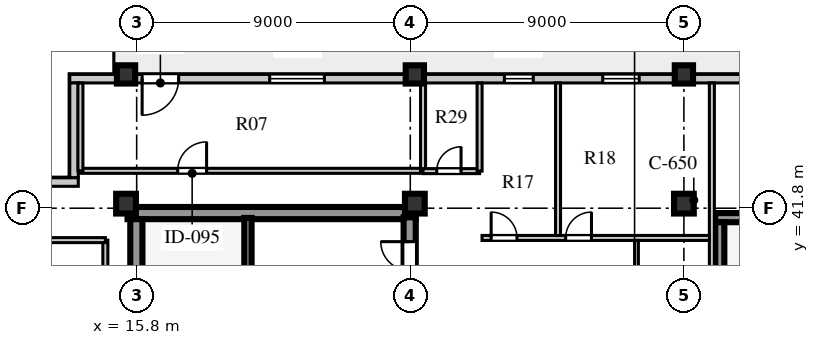
"""IFC4 building model, lengths in metres.
Left out: names, types, materials, properties, quantities, classifications, styles, units other than length and angle.
Written with IfcOpenShell. Run it as: python <this file> out.ifc"""

import sys

from ifc_helpers import new_model, si_unit, direction, frame, frame_2d, origin, origin_2d, place, context, subcontext, project, spatial, rectangle, extrude, element, fill, save


model = new_model("IFC4")
c1 = context("Model", 3, precision=1e-05, world=origin(), true_north=direction((0.0, 1.0)))
c2 = subcontext(c1, "Body", "Model", "MODEL_VIEW")
j1 = project(units=[si_unit("LENGTHUNIT", "METRE"), si_unit("PLANEANGLEUNIT", "RADIAN")], contexts=[c1])
p1 = place(None, origin())
s1 = spatial("IfcSite", under=j1, at=p1, CompositionType="ELEMENT")
p2 = place(p1, origin())
s2 = spatial("IfcBuilding", under=s1, at=p2, CompositionType="ELEMENT")
p3 = place(p2, frame((0.0, 0.0, 327.7)))
s3 = spatial("IfcBuildingStorey", under=s2, at=p3, CompositionType="ELEMENT", Elevation=327.7)
p4 = place(p3, frame((15.5, 41.64, 0.0), z_axis=(0.0, 0.0, 1.0), x_axis=(1.0, 0.0, 0.0)))
e1 = element("IfcWall", 1, at=p4, inside=s3, PredefinedType="SHEAR", context=c2, shape_type="SweptSolid", body=[
    extrude(rectangle(XDim=9.48, YDim=0.4, at=frame_2d((4.74, 0.0))), origin(), (0.0, 0.0, 1.0), 3.56),
])
p5 = place(p3, frame((15.79, 15.81, 0.0), z_axis=(0.0, 0.0, 1.0), x_axis=(0.0, 1.0, 0.0)))
e2 = element("IfcWall", 2, at=p5, inside=s3, PredefinedType="SHEAR", context=c2, shape_type="SweptSolid", body=[
    extrude(rectangle(XDim=25.63, YDim=0.4, at=frame_2d((12.815, 0.0))), origin(), (0.0, 0.0, 1.0), 3.56),
])
p6 = place(p3, frame((24.78, 15.74, 0.0), z_axis=(0.0, 0.0, 1.0), x_axis=(0.0, 1.0, 0.0)))
e3 = element("IfcWall", 3, at=p6, inside=s3, PredefinedType="SHEAR", context=c2, shape_type="SweptSolid", body=[
    extrude(rectangle(XDim=25.76, YDim=0.4, at=frame_2d((12.88, 0.0))), origin(), (0.0, 0.0, 1.0), 3.56),
])
p7 = place(p6, frame((1.61, 0.0, 0.0)))
e4 = element("IfcOpeningElement", 4, at=p7, cuts=e3, PredefinedType="OPENING", context=c2, shape_type="SweptSolid", body=[
    extrude(rectangle(XDim=1.2, YDim=2.1, at=frame_2d((0.6, 1.05))), frame((0.0, 0.21, 0.0), z_axis=(0.0, -1.0, 0.0), x_axis=(1.0, 0.0, 0.0)), (0.0, 0.0, 1.0), 0.42),
])
p8 = place(p6, frame((6.78, 0.0, 0.0)))
e5 = element("IfcOpeningElement", 5, at=p8, cuts=e3, PredefinedType="OPENING", context=c2, shape_type="SweptSolid", body=[
    extrude(rectangle(XDim=0.85, YDim=2.06, at=frame_2d((0.425, 1.03))), frame((0.0, 0.21, 0.0), z_axis=(0.0, -1.0, 0.0), x_axis=(1.0, 0.0, 0.0)), (0.0, 0.0, 1.0), 0.42),
])
p9 = place(p6, frame((12.11, 0.0, 0.0)))
e6 = element("IfcOpeningElement", 6, at=p9, cuts=e3, PredefinedType="OPENING", context=c2, shape_type="SweptSolid", body=[
    extrude(rectangle(XDim=1.5, YDim=2.12, at=frame_2d((0.75, 1.06))), frame((0.0, 0.21, 0.0), z_axis=(0.0, -1.0, 0.0), x_axis=(1.0, 0.0, 0.0)), (0.0, 0.0, 1.0), 0.42),
])
p10 = place(p6, frame((20.11, 0.0, 0.0)))
e7 = element("IfcOpeningElement", 7, at=p10, cuts=e3, PredefinedType="OPENING", context=c2, shape_type="SweptSolid", body=[
    extrude(rectangle(XDim=1.2, YDim=2.12, at=frame_2d((0.6, 1.06))), frame((0.0, 0.21, 0.0), z_axis=(0.0, -1.0, 0.0), x_axis=(1.0, 0.0, 0.0)), (0.0, 0.0, 1.0), 0.42),
])
p11 = place(p6, frame((24.01, 0.0, 0.0)))
e8 = element("IfcOpeningElement", 8, at=p11, cuts=e3, PredefinedType="OPENING", context=c2, shape_type="SweptSolid", body=[
    extrude(rectangle(XDim=0.95, YDim=2.1, at=frame_2d((0.475, 1.05))), frame((0.0, 0.21, 0.0), z_axis=(0.0, -1.0, 0.0), x_axis=(1.0, 0.0, 0.0)), (0.0, 0.0, 1.0), 0.42),
])
p12 = place(p3, frame((34.83, 41.49, 0.0), z_axis=(0.0, 0.0, 1.0), x_axis=(1.0, 0.0, 0.0)))
e9 = element("IfcWall", 9, at=p12, inside=s3, PredefinedType="SHEAR", context=c2, shape_type="SweptSolid", body=[
    extrude(rectangle(XDim=4.04, YDim=0.3, at=frame_2d((2.02, 0.0))), origin(), (0.0, 0.0, 1.0), 3.56),
])
p13 = place(p3, frame((34.98, 33.31, 0.0), z_axis=(0.0, 0.0, 1.0), x_axis=(0.0, 1.0, 0.0)))
e10 = element("IfcWall", 10, at=p13, inside=s3, PredefinedType="SHEAR", context=c2, shape_type="SweptSolid", body=[
    extrude(rectangle(XDim=8.03, YDim=0.3, at=frame_2d((4.015, 0.0))), origin(), (0.0, 0.0, 1.0), 3.56),
])
p14 = place(p13, frame((0.35, 0.0, 0.0)))
e11 = element("IfcOpeningElement", 11, at=p14, cuts=e10, PredefinedType="OPENING", context=c2, shape_type="SweptSolid", body=[
    extrude(rectangle(XDim=1.1, YDim=2.1, at=frame_2d((0.55, 1.05))), frame((0.0, 0.16, 0.0), z_axis=(0.0, -1.0, 0.0), x_axis=(1.0, 0.0, 0.0)), (0.0, 0.0, 1.0), 0.32),
])
for number, where, z_axis, x_axis in (
    (12, (15.45, 41.95, 0.0), (0.0, 0.0, 1.0), (1.0, 0.0, 0.0)),
    (13, (24.95, 41.95, 0.0), (0.0, 0.0, 1.0), (1.0, 0.0, 0.0)),
    (14, (33.8, 41.95, 0.0), (0.0, 0.0, 1.0), (1.0, 0.0, 0.0)),
):
    element("IfcColumn", number, at=place(p3, frame(where, z_axis=z_axis, x_axis=x_axis)), inside=s3, PredefinedType="COLUMN", context=c2, shape_type="SweptSolid", body=[
        extrude(rectangle(XDim=0.65, YDim=0.65, at=origin_2d()), origin(), (0.0, 0.0, 1.0), 3.56),
    ])
for number, where, z_axis, x_axis in (
    (15, (15.45, 46.2, 0.0), (0.0, 0.0, 1.0), (1.0, 0.0, 0.0)),
    (16, (24.95, 46.2, 0.0), (0.0, 0.0, 1.0), (1.0, 0.0, 0.0)),
    (17, (33.8, 46.2, 0.0), (0.0, 0.0, 1.0), (1.0, 0.0, 0.0)),
):
    element("IfcColumn", number, at=place(p3, frame(where, z_axis=z_axis, x_axis=x_axis)), inside=s3, PredefinedType="COLUMN", context=c2, shape_type="SweptSolid", body=[
        extrude(rectangle(XDim=0.6, YDim=0.6, at=origin_2d()), origin(), (0.0, 0.0, 1.0), 3.56),
    ])
p15 = place(p3, frame((41.6, 46.06, 0.0), z_axis=(0.0, 0.0, 1.0), x_axis=(-1.0, 0.0, 0.0)))
e18 = element("IfcWall", 18, at=p15, inside=s3, PredefinedType="STANDARD", context=c2, shape_type="SweptSolid", body=[
    extrude(rectangle(XDim=28.0, YDim=0.28, at=frame_2d((14.0, 0.0))), origin(), (0.0, 0.0, 1.0), 2.92),
])
p16 = place(p15, frame((24.42, 0.0, 0.0)))
e19 = element("IfcOpeningElement", 19, at=p16, cuts=e18, PredefinedType="OPENING", context=c2, shape_type="SweptSolid", body=[
    extrude(rectangle(XDim=1.2, YDim=2.05, at=frame_2d((0.6, 1.025))), frame((0.0, 0.15, 0.0), z_axis=(0.0, -1.0, 0.0), x_axis=(1.0, 0.0, 0.0)), (0.0, 0.0, 1.0), 0.3),
])
p17 = place(p15, frame((19.625, 0.0, 0.8)))
e20 = element("IfcOpeningElement", 20, at=p17, cuts=e18, PredefinedType="OPENING", context=c2, shape_type="SweptSolid", body=[
    extrude(rectangle(XDim=1.8, YDim=2.0, at=frame_2d((0.9, 1.0))), frame((0.0, 0.15, 0.0), z_axis=(0.0, -1.0, 0.0), x_axis=(1.0, 0.0, 0.0)), (0.0, 0.0, 1.0), 0.3),
])
p18 = place(p15, frame((12.755, 0.0, 0.8)))
e21 = element("IfcOpeningElement", 21, at=p18, cuts=e18, PredefinedType="OPENING", context=c2, shape_type="SweptSolid", body=[
    extrude(rectangle(XDim=0.95, YDim=1.65, at=frame_2d((0.475, 0.825))), frame((0.0, 0.15, 0.0), z_axis=(0.0, -1.0, 0.0), x_axis=(1.0, 0.0, 0.0)), (0.0, 0.0, 1.0), 0.3),
])
p19 = place(p15, frame((9.27, 0.0, 0.8)))
e22 = element("IfcOpeningElement", 22, at=p19, cuts=e18, PredefinedType="OPENING", context=c2, shape_type="SweptSolid", body=[
    extrude(rectangle(XDim=1.2, YDim=1.75, at=frame_2d((0.6, 0.875))), frame((0.0, 0.15, 0.0), z_axis=(0.0, -1.0, 0.0), x_axis=(1.0, 0.0, 0.0)), (0.0, 0.0, 1.0), 0.3),
])
p20 = place(p15, frame((2.175, 0.0, 0.8)))
e23 = element("IfcOpeningElement", 23, at=p20, cuts=e18, PredefinedType="OPENING", context=c2, shape_type="SweptSolid", body=[
    extrude(rectangle(XDim=2.4, YDim=2.05, at=frame_2d((1.2, 1.025))), frame((0.0, 0.15, 0.0), z_axis=(0.0, -1.0, 0.0), x_axis=(1.0, 0.0, 0.0)), (0.0, 0.0, 1.0), 0.3),
])
p21 = place(p3, frame((13.74, 45.92, 0.0), z_axis=(0.0, 0.0, 1.0), x_axis=(0.0, -1.0, 0.0)))
e24 = element("IfcWall", 24, at=p21, inside=s3, PredefinedType="STANDARD", context=c2, shape_type="SweptSolid", body=[
    extrude(rectangle(XDim=3.12, YDim=0.28, at=frame_2d((1.56, 0.0))), origin(), (0.0, 0.0, 1.0), 2.92),
])
p22 = place(p3, frame((13.88, 42.66, 0.0), z_axis=(0.0, 0.0, 1.0), x_axis=(-1.0, 0.0, 0.0)))
e25 = element("IfcWall", 25, at=p22, inside=s3, PredefinedType="STANDARD", context=c2, shape_type="SweptSolid", body=[
    extrude(rectangle(XDim=3.68, YDim=0.28, at=frame_2d((1.84, 0.0))), origin(), (0.0, 0.0, 1.0), 2.92),
])
p23 = place(p3, frame((19.46, 33.3, 0.0), z_axis=(0.0, 0.0, 1.0), x_axis=(0.0, 1.0, 0.0)))
e26 = element("IfcWall", 26, at=p23, inside=s3, PredefinedType="SHEAR", context=c2, shape_type="SweptSolid", body=[
    extrude(rectangle(XDim=8.18, YDim=0.24, at=frame_2d((4.09, 0.0))), origin(), (0.0, 0.0, 1.0), 3.8),
])
p24 = place(p23, frame((0.65, 0.0, 0.0)))
e27 = element("IfcOpeningElement", 27, at=p24, cuts=e26, PredefinedType="OPENING", context=c2, shape_type="SweptSolid", body=[
    extrude(rectangle(XDim=1.1, YDim=2.1, at=frame_2d((0.55, 1.05))), frame((0.0, 0.13, 0.0), z_axis=(0.0, -1.0, 0.0), x_axis=(1.0, 0.0, 0.0)), (0.0, 0.0, 1.0), 0.26),
])
p25 = place(p3, frame((13.95, 43.03, 0.0), z_axis=(0.0, 0.0, 1.0), x_axis=(1.0, 0.0, 0.0)))
e28 = element("IfcWall", 28, at=p25, inside=s3, PredefinedType="PARTITIONING", context=c2, shape_type="SweptSolid", body=[
    extrude(rectangle(XDim=11.27, YDim=0.165, at=frame_2d((5.635, 0.0))), origin(), (0.0, 0.0, 1.0), 3.56),
])
p26 = place(p25, frame((3.2, 0.0, 0.0)))
e29 = element("IfcOpeningElement", 29, at=p26, cuts=e28, PredefinedType="OPENING", context=c2, shape_type="SweptSolid", body=[
    extrude(rectangle(XDim=0.95, YDim=2.08, at=frame_2d((0.475, 1.04))), frame((0.0, 0.093, 0.0), z_axis=(0.0, -1.0, 0.0), x_axis=(1.0, 0.0, 0.0)), (0.0, 0.0, 1.0), 0.185),
])
p27 = place(p3, frame((13.95, 43.03, 0.0), z_axis=(0.0, 0.0, 1.0), x_axis=(0.0, 1.0, 0.0)))
e30 = element("IfcWall", 30, at=p27, inside=s3, PredefinedType="PARTITIONING", context=c2, shape_type="SweptSolid", body=[
    extrude(rectangle(XDim=2.89, YDim=0.165, at=frame_2d((1.445, 0.0))), origin(), (0.0, 0.0, 1.0), 3.56),
])
p28 = place(p3, frame((25.22, 43.03, 0.0), z_axis=(0.0, 0.0, 1.0), x_axis=(0.0, 1.0, 0.0)))
e31 = element("IfcWall", 31, at=p28, inside=s3, PredefinedType="PARTITIONING", context=c2, shape_type="SweptSolid", body=[
    extrude(rectangle(XDim=2.89, YDim=0.165, at=frame_2d((1.445, 0.0))), origin(), (0.0, 0.0, 1.0), 3.11),
])
p29 = place(p3, frame((14.77, 16.45, 0.0), z_axis=(0.0, 0.0, 1.0), x_axis=(0.0, 1.0, 0.0)))
e32 = element("IfcWall", 32, at=p29, inside=s3, PredefinedType="PARTITIONING", context=c2, shape_type="SweptSolid", body=[
    extrude(rectangle(XDim=24.3, YDim=0.165, at=frame_2d((12.15, 0.0))), origin(), (0.0, 0.0, 1.0), 3.56),
])
p30 = place(p29, frame((5.1, 0.0, 0.0)))
e33 = element("IfcOpeningElement", 33, at=p30, cuts=e32, PredefinedType="OPENING", context=c2, shape_type="SweptSolid", body=[
    extrude(rectangle(XDim=0.95, YDim=2.08, at=frame_2d((0.475, 1.04))), frame((0.0, 0.093, 0.0), z_axis=(0.0, -1.0, 0.0), x_axis=(1.0, 0.0, 0.0)), (0.0, 0.0, 1.0), 0.185),
])
p31 = place(p3, frame((10.48, 40.75, 0.0), z_axis=(0.0, 0.0, 1.0), x_axis=(1.0, 0.0, 0.0)))
e34 = element("IfcWall", 34, at=p31, inside=s3, PredefinedType="PARTITIONING", context=c2, shape_type="SweptSolid", body=[
    extrude(rectangle(XDim=4.29, YDim=0.165, at=frame_2d((2.145, 0.0))), origin(), (0.0, 0.0, 1.0), 3.56),
])
p32 = place(p3, frame((34.72, 35.22, 0.0), z_axis=(0.0, 0.0, 1.0), x_axis=(0.0, 1.0, 0.0)))
e35 = element("IfcWall", 35, at=p32, inside=s3, PredefinedType="PARTITIONING", context=c2, shape_type="SweptSolid", body=[
    extrude(rectangle(XDim=10.7, YDim=0.165, at=frame_2d((5.35, 0.0))), origin(), (0.0, 0.0, 1.0), 3.56),
])
p33 = place(p3, frame((27.16, 40.822, 0.0), z_axis=(0.0, 0.0, 1.0), x_axis=(1.0, 0.0, 0.0)))
e36 = element("IfcWall", 36, at=p33, inside=s3, PredefinedType="PARTITIONING", context=c2, shape_type="SweptSolid", body=[
    extrude(rectangle(XDim=7.48, YDim=0.165, at=frame_2d((3.74, 0.0))), origin(), (0.0, 0.0, 1.0), 3.56),
])
p34 = place(p33, frame((0.3, 0.0, 0.0)))
e37 = element("IfcOpeningElement", 37, at=p34, cuts=e36, PredefinedType="OPENING", context=c2, shape_type="SweptSolid", body=[
    extrude(rectangle(XDim=0.85, YDim=2.08, at=frame_2d((0.425, 1.04))), frame((0.0, 0.093, 0.0), z_axis=(0.0, -1.0, 0.0), x_axis=(1.0, 0.0, 0.0)), (0.0, 0.0, 1.0), 0.185),
])
p35 = place(p33, frame((2.75, 0.0, 0.0)))
e38 = element("IfcOpeningElement", 38, at=p35, cuts=e36, PredefinedType="OPENING", context=c2, shape_type="SweptSolid", body=[
    extrude(rectangle(XDim=0.85, YDim=2.08, at=frame_2d((0.425, 1.04))), frame((0.0, 0.093, 0.0), z_axis=(0.0, -1.0, 0.0), x_axis=(1.0, 0.0, 0.0)), (0.0, 0.0, 1.0), 0.185),
])
p36 = place(p3, frame((32.24, 35.3, 0.0), z_axis=(0.0, 0.0, 1.0), x_axis=(0.0, 1.0, 0.0)))
e39 = element("IfcWall", 39, at=p36, inside=s3, PredefinedType="PLUMBINGWALL", context=c2, shape_type="SweptSolid", body=[
    extrude(rectangle(XDim=5.442, YDim=0.125, at=frame_2d((2.721, 0.0))), origin(), (0.0, 0.0, 1.0), 3.56),
])
p37 = place(p36, frame((0.16, 0.0, 0.0)))
e40 = element("IfcOpeningElement", 40, at=p37, cuts=e39, PredefinedType="OPENING", context=c2, shape_type="SweptSolid", body=[
    extrude(rectangle(XDim=0.8, YDim=2.05, at=frame_2d((0.4, 1.025))), frame((0.0, 0.073, 0.0), z_axis=(0.0, -1.0, 0.0), x_axis=(1.0, 0.0, 0.0)), (0.0, 0.0, 1.0), 0.145),
])
p38 = place(p36, frame((2.892, 0.0, 0.0)))
e41 = element("IfcOpeningElement", 41, at=p38, cuts=e39, PredefinedType="OPENING", context=c2, shape_type="SweptSolid", body=[
    extrude(rectangle(XDim=0.85, YDim=2.08, at=frame_2d((0.425, 1.04))), frame((0.0, 0.073, 0.0), z_axis=(0.0, -1.0, 0.0), x_axis=(1.0, 0.0, 0.0)), (0.0, 0.0, 1.0), 0.145),
])
p39 = place(p3, frame((29.66, 40.902, 0.0), z_axis=(0.0, 0.0, 1.0), x_axis=(0.0, 1.0, 0.0)))
e42 = element("IfcWall", 42, at=p39, inside=s3, PredefinedType="PARTITIONING", context=c2, shape_type="SweptSolid", body=[
    extrude(rectangle(XDim=5.018, YDim=0.165, at=frame_2d((2.509, 0.0))), origin(), (0.0, 0.0, 1.0), 3.56),
])
p40 = place(p3, frame((25.22, 43.02, 0.0), z_axis=(0.0, 0.0, 1.0), x_axis=(1.0, 0.0, 0.0)))
e43 = element("IfcWall", 43, at=p40, inside=s3, PredefinedType="PARTITIONING", context=c2, shape_type="SweptSolid", body=[
    extrude(rectangle(XDim=1.86, YDim=0.165, at=frame_2d((0.93, 0.0))), origin(), (0.0, 0.0, 1.0), 3.56),
])
p41 = place(p40, frame((0.45, 0.0, 0.0)))
e44 = element("IfcOpeningElement", 44, at=p41, cuts=e43, PredefinedType="OPENING", context=c2, shape_type="SweptSolid", body=[
    extrude(rectangle(XDim=0.8, YDim=2.05, at=frame_2d((0.4, 1.025))), frame((0.0, 0.093, 0.0), z_axis=(0.0, -1.0, 0.0), x_axis=(1.0, 0.0, 0.0)), (0.0, 0.0, 1.0), 0.185),
])
p42 = place(p3, frame((27.08, 43.02, 0.0), z_axis=(0.0, 0.0, 1.0), x_axis=(0.0, 1.0, 0.0)))
e45 = element("IfcWall", 45, at=p42, inside=s3, PredefinedType="PARTITIONING", context=c2, shape_type="SweptSolid", body=[
    extrude(rectangle(XDim=2.9, YDim=0.165, at=frame_2d((1.45, 0.0))), origin(), (0.0, 0.0, 1.0), 3.56),
])
p43 = place(p16, frame((1.2, 0.0, 0.0), z_axis=(0.0, 0.0, 1.0), x_axis=(-1.0, 0.0, 0.0)))
e46 = element("IfcDoor", 46, at=p43, inside=s3, OperationType="SINGLE_SWING_LEFT", PredefinedType="DOOR", context=c2, shape_type="SweptSolid", body=[
    extrude(rectangle(XDim=1.2, YDim=2.05, at=frame_2d((0.6, 1.025))), frame((0.0, 0.025, 0.0), z_axis=(0.0, -1.0, 0.0), x_axis=(1.0, 0.0, 0.0)), (0.0, 0.0, 1.0), 0.05),
])
fill(e19, e46)
p44 = place(p17, origin())
e47 = element("IfcWindow", 47, at=p44, inside=s3, PartitioningType="SINGLE_PANEL", PredefinedType="WINDOW", context=c2, shape_type="SweptSolid", body=[
    extrude(rectangle(XDim=1.8, YDim=2.0, at=frame_2d((0.9, 1.0))), frame((0.0, 0.03, 0.0), z_axis=(0.0, -1.0, 0.0), x_axis=(1.0, 0.0, 0.0)), (0.0, 0.0, 1.0), 0.06),
])
fill(e20, e47)
p45 = place(p18, origin())
e48 = element("IfcWindow", 48, at=p45, inside=s3, PartitioningType="SINGLE_PANEL", PredefinedType="WINDOW", context=c2, shape_type="SweptSolid", body=[
    extrude(rectangle(XDim=0.95, YDim=1.65, at=frame_2d((0.475, 0.825))), frame((0.0, 0.03, 0.0), z_axis=(0.0, -1.0, 0.0), x_axis=(1.0, 0.0, 0.0)), (0.0, 0.0, 1.0), 0.06),
])
fill(e21, e48)
p46 = place(p19, origin())
e49 = element("IfcWindow", 49, at=p46, inside=s3, PartitioningType="SINGLE_PANEL", PredefinedType="WINDOW", context=c2, shape_type="SweptSolid", body=[
    extrude(rectangle(XDim=1.2, YDim=1.75, at=frame_2d((0.6, 0.875))), frame((0.0, 0.03, 0.0), z_axis=(0.0, -1.0, 0.0), x_axis=(1.0, 0.0, 0.0)), (0.0, 0.0, 1.0), 0.06),
])
fill(e22, e49)
p47 = place(p11, frame((0.95, 0.0, 0.0), z_axis=(0.0, 0.0, 1.0), x_axis=(-1.0, 0.0, 0.0)))
e50 = element("IfcDoor", 50, at=p47, inside=s3, OperationType="SINGLE_SWING_LEFT", PredefinedType="DOOR", context=c2, shape_type="SweptSolid", body=[
    extrude(rectangle(XDim=0.95, YDim=2.1, at=frame_2d((0.475, 1.05))), frame((0.0, 0.025, 0.0), z_axis=(0.0, -1.0, 0.0), x_axis=(1.0, 0.0, 0.0)), (0.0, 0.0, 1.0), 0.05),
])
fill(e8, e50)
p48 = place(p26, origin())
e51 = element("IfcDoor", 51, at=p48, inside=s3, OperationType="SINGLE_SWING_RIGHT", PredefinedType="DOOR", context=c2, shape_type="SweptSolid", body=[
    extrude(rectangle(XDim=0.95, YDim=2.08, at=frame_2d((0.475, 1.04))), frame((0.0, 0.025, 0.0), z_axis=(0.0, -1.0, 0.0), x_axis=(1.0, 0.0, 0.0)), (0.0, 0.0, 1.0), 0.05),
])
fill(e29, e51)
p49 = place(p34, origin())
e52 = element("IfcDoor", 52, at=p49, inside=s3, OperationType="SINGLE_SWING_LEFT", PredefinedType="DOOR", context=c2, shape_type="SweptSolid", body=[
    extrude(rectangle(XDim=0.85, YDim=2.08, at=frame_2d((0.425, 1.04))), frame((0.0, 0.025, 0.0), z_axis=(0.0, -1.0, 0.0), x_axis=(1.0, 0.0, 0.0)), (0.0, 0.0, 1.0), 0.05),
])
fill(e37, e52)
p50 = place(p35, origin())
e53 = element("IfcDoor", 53, at=p50, inside=s3, OperationType="SINGLE_SWING_RIGHT", PredefinedType="DOOR", context=c2, shape_type="SweptSolid", body=[
    extrude(rectangle(XDim=0.85, YDim=2.08, at=frame_2d((0.425, 1.04))), frame((0.0, 0.025, 0.0), z_axis=(0.0, -1.0, 0.0), x_axis=(1.0, 0.0, 0.0)), (0.0, 0.0, 1.0), 0.05),
])
fill(e38, e53)
p51 = place(p41, frame((0.8, 0.0, 0.0), z_axis=(0.0, 0.0, 1.0), x_axis=(-1.0, 0.0, 0.0)))
e54 = element("IfcDoor", 54, at=p51, inside=s3, OperationType="SINGLE_SWING_LEFT", PredefinedType="DOOR", context=c2, shape_type="SweptSolid", body=[
    extrude(rectangle(XDim=0.8, YDim=2.05, at=frame_2d((0.4, 1.025))), frame((0.0, 0.025, 0.0), z_axis=(0.0, -1.0, 0.0), x_axis=(1.0, 0.0, 0.0)), (0.0, 0.0, 1.0), 0.05),
])
fill(e44, e54)
save(model, sys.argv[1])
